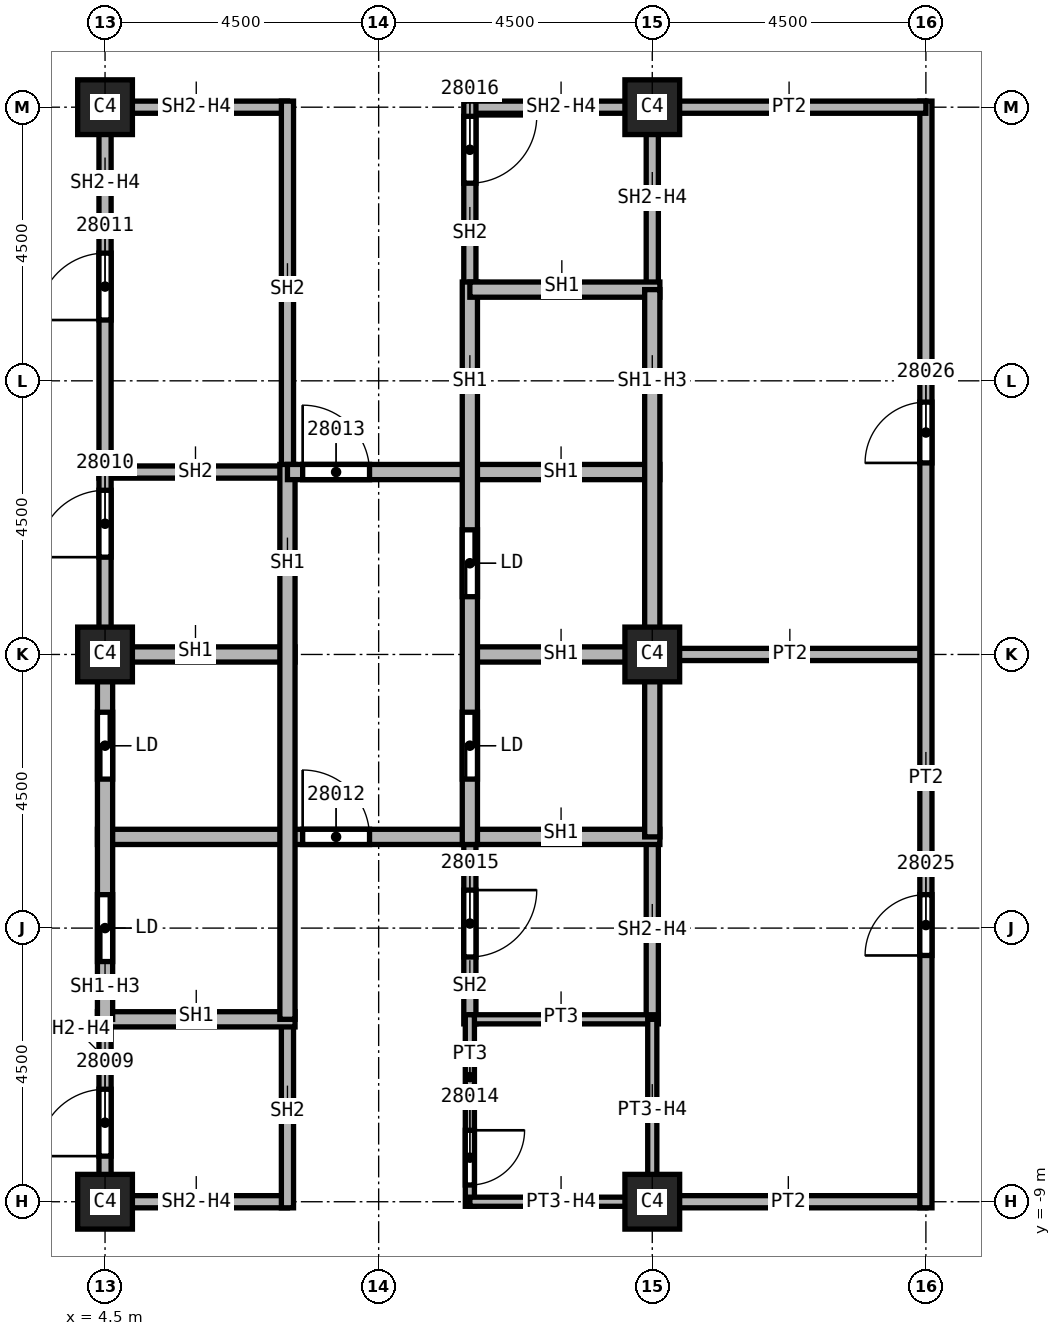
"""IFC4 building model, lengths in metres.
Left out: names, types, materials, properties, quantities, classifications, styles, units other than length and angle.
Written with IfcOpenShell. Run it as: python <this file> out.ifc"""

import sys

from ifc_helpers import new_model, si_unit, direction, frame, frame_2d, origin, origin_2d, place, context, subcontext, project, spatial, rectangle, extrude, element, fill, save


model = new_model("IFC4")
c1 = context("Model", 3, precision=1e-05, world=origin(), true_north=direction((0.0, 1.0)))
c2 = subcontext(c1, "Body", "Model", "MODEL_VIEW")
j1 = project(units=[si_unit("LENGTHUNIT", "METRE"), si_unit("PLANEANGLEUNIT", "RADIAN")], contexts=[c1])
p1 = place(None, origin())
s1 = spatial("IfcSite", under=j1, at=p1, CompositionType="ELEMENT")
p2 = place(p1, origin())
s2 = spatial("IfcBuilding", under=s1, at=p2, CompositionType="ELEMENT")
p3 = place(p2, frame((0.0, 0.0, 236.0)))
s3 = spatial("IfcBuildingStorey", under=s2, at=p3, CompositionType="ELEMENT", Elevation=236.0)
for number, where, z_axis, x_axis in (
    (1, (4.5, 0.0, 0.0), (0.0, 0.0, 1.0), (1.0, 0.0, 0.0)),
    (2, (4.5, 9.0, 0.0), (0.0, 0.0, 1.0), (1.0, 0.0, 0.0)),
    (3, (4.5, -9.0, 0.0), (0.0, 0.0, 1.0), (1.0, 0.0, 0.0)),
    (4, (13.5, 0.0, 0.0), (0.0, 0.0, 1.0), (1.0, 0.0, 0.0)),
    (5, (13.5, 9.0, 0.0), (0.0, 0.0, 1.0), (1.0, 0.0, 0.0)),
    (6, (13.5, -9.0, 0.0), (0.0, 0.0, 1.0), (1.0, 0.0, 0.0)),
):
    element("IfcColumn", number, at=place(p3, frame(where, z_axis=z_axis, x_axis=x_axis)), inside=s3, PredefinedType="COLUMN", context=c2, shape_type="SweptSolid", body=[
        extrude(rectangle(XDim=0.9, YDim=0.9, at=origin_2d()), origin(), (0.0, 0.0, 1.0), 5.72),
    ])
for number, where, z_axis, x_axis in (
    (7, (13.5, -9.0, 0.0), (0.0, 0.0, 1.0), (1.0, 0.0, 0.0)),
    (8, (13.5, 0.0, 0.0), (0.0, 0.0, 1.0), (1.0, 0.0, 0.0)),
):
    element("IfcWall", number, at=place(p3, frame(where, z_axis=z_axis, x_axis=x_axis)), inside=s3, PredefinedType="PARTITIONING", context=c2, shape_type="SweptSolid", body=[
        extrude(rectangle(XDim=4.5, YDim=0.2, at=frame_2d((2.25, 0.0))), origin(), (0.0, 0.0, 1.0), 5.72),
    ])
p4 = place(p3, frame((18.0, -9.1, 0.0), z_axis=(0.0, 0.0, 1.0), x_axis=(0.0, 1.0, 0.0)))
e9 = element("IfcWall", 9, at=p4, inside=s3, PredefinedType="PARTITIONING", context=c2, shape_type="SweptSolid", body=[
    extrude(rectangle(XDim=18.2, YDim=0.2, at=frame_2d((9.1, 0.0))), origin(), (0.0, 0.0, 1.0), 5.72),
])
p5 = place(p4, frame((4.15, 0.0, 0.0)))
e10 = element("IfcOpeningElement", 10, at=p5, cuts=e9, PredefinedType="OPENING", context=c2, shape_type="SweptSolid", body=[
    extrude(rectangle(XDim=1.0, YDim=2.1, at=frame_2d((0.5, 1.05))), frame((0.0, 0.1, 0.0), z_axis=(0.0, -1.0, 0.0), x_axis=(1.0, 0.0, 0.0)), (0.0, 0.0, 1.0), 0.2),
])
p6 = place(p4, frame((12.25, 0.0, 0.0)))
e11 = element("IfcOpeningElement", 11, at=p6, cuts=e9, PredefinedType="OPENING", context=c2, shape_type="SweptSolid", body=[
    extrude(rectangle(XDim=1.0, YDim=2.1, at=frame_2d((0.5, 1.05))), frame((0.0, 0.1, 0.0), z_axis=(0.0, -1.0, 0.0), x_axis=(1.0, 0.0, 0.0)), (0.0, 0.0, 1.0), 0.2),
])
p7 = place(p3, frame((18.0, 9.0, 0.0), z_axis=(0.0, 0.0, 1.0), x_axis=(-1.0, 0.0, 0.0)))
e12 = element("IfcWall", 12, at=p7, inside=s3, PredefinedType="PARTITIONING", context=c2, shape_type="SweptSolid", body=[
    extrude(rectangle(XDim=4.5, YDim=0.2, at=frame_2d((2.25, 0.0))), origin(), (0.0, 0.0, 1.0), 5.72),
])
p8 = place(p3, frame((4.4, 3.0, 0.0), z_axis=(0.0, 0.0, 1.0), x_axis=(1.0, 0.0, 0.0)))
e13 = element("IfcWall", 13, at=p8, inside=s3, PredefinedType="SOLIDWALL", context=c2, shape_type="SweptSolid", body=[
    extrude(rectangle(XDim=3.225, YDim=0.2, at=frame_2d((1.613, 0.0))), origin(), (0.0, 0.0, 1.0), 5.72),
])
p9 = place(p3, frame((4.5, -9.1, 0.0), z_axis=(0.0, 0.0, 1.0), x_axis=(0.0, 1.0, 0.0)))
e14 = element("IfcWall", 14, at=p9, inside=s3, PredefinedType="SOLIDWALL", context=c2, shape_type="SweptSolid", body=[
    extrude(rectangle(XDim=3.1, YDim=0.2, at=frame_2d((1.55, 0.0))), origin(), (0.0, 0.0, 1.0), 5.042),
])
p10 = place(p9, frame((0.85, 0.0, 0.0)))
e15 = element("IfcOpeningElement", 15, at=p10, cuts=e14, PredefinedType="OPENING", context=c2, shape_type="SweptSolid", body=[
    extrude(rectangle(XDim=1.1, YDim=2.1, at=frame_2d((0.55, 1.05))), frame((0.0, 0.1, 0.0), z_axis=(0.0, -1.0, 0.0), x_axis=(1.0, 0.0, 0.0)), (0.0, 0.0, 1.0), 0.2),
])
p11 = place(p3, frame((4.5, 0.0, 0.0), z_axis=(0.0, 0.0, 1.0), x_axis=(0.0, 1.0, 0.0)))
e16 = element("IfcWall", 16, at=p11, inside=s3, PredefinedType="SOLIDWALL", context=c2, shape_type="SweptSolid", body=[
    extrude(rectangle(XDim=9.1, YDim=0.2, at=frame_2d((4.55, 0.0))), origin(), (0.0, 0.0, 1.0), 5.042),
])
p12 = place(p11, frame((1.6, 0.0, 0.0)))
e17 = element("IfcOpeningElement", 17, at=p12, cuts=e16, PredefinedType="OPENING", context=c2, shape_type="SweptSolid", body=[
    extrude(rectangle(XDim=1.1, YDim=2.1, at=frame_2d((0.55, 1.05))), frame((0.0, 0.1, 0.0), z_axis=(0.0, -1.0, 0.0), x_axis=(1.0, 0.0, 0.0)), (0.0, 0.0, 1.0), 0.2),
])
p13 = place(p11, frame((5.5, 0.0, 0.0)))
e18 = element("IfcOpeningElement", 18, at=p13, cuts=e16, PredefinedType="OPENING", context=c2, shape_type="SweptSolid", body=[
    extrude(rectangle(XDim=1.1, YDim=2.1, at=frame_2d((0.55, 1.05))), frame((0.0, 0.1, 0.0), z_axis=(0.0, -1.0, 0.0), x_axis=(1.0, 0.0, 0.0)), (0.0, 0.0, 1.0), 0.2),
])
for number, where, z_axis, x_axis in (
    (19, (4.5, 9.0, 0.0), (0.0, 0.0, 1.0), (1.0, 0.0, 0.0)),
    (20, (7.5, -9.0, 0.0), (0.0, 0.0, 1.0), (-1.0, 0.0, 0.0)),
):
    element("IfcWall", number, at=place(p3, frame(where, z_axis=z_axis, x_axis=x_axis)), inside=s3, PredefinedType="SOLIDWALL", context=c2, shape_type="SweptSolid", body=[
        extrude(rectangle(XDim=3.0, YDim=0.2, at=frame_2d((1.5, 0.0))), origin(), (0.0, 0.0, 1.0), 5.042),
    ])
p14 = place(p3, frame((7.5, -6.0, 0.0), z_axis=(0.0, 0.0, 1.0), x_axis=(0.0, -1.0, 0.0)))
e21 = element("IfcWall", 21, at=p14, inside=s3, PredefinedType="SOLIDWALL", context=c2, shape_type="SweptSolid", body=[
    extrude(rectangle(XDim=3.1, YDim=0.2, at=frame_2d((1.55, 0.0))), origin(), (0.0, 0.0, 1.0), 5.72),
])
p15 = place(p3, frame((7.5, 9.1, 0.0), z_axis=(0.0, 0.0, 1.0), x_axis=(0.0, -1.0, 0.0)))
e22 = element("IfcWall", 22, at=p15, inside=s3, PredefinedType="SOLIDWALL", context=c2, shape_type="SweptSolid", body=[
    extrude(rectangle(XDim=6.225, YDim=0.2, at=frame_2d((3.113, 0.0))), origin(), (0.0, 0.0, 1.0), 5.72),
])
p16 = place(p3, frame((10.5, -2.875, 0.0), z_axis=(0.0, 0.0, 1.0), x_axis=(0.0, -1.0, 0.0)))
e23 = element("IfcWall", 23, at=p16, inside=s3, PredefinedType="SOLIDWALL", context=c2, shape_type="SweptSolid", body=[
    extrude(rectangle(XDim=3.2, YDim=0.2, at=frame_2d((1.6, 0.0))), origin(), (0.0, 0.0, 1.0), 5.72),
])
p17 = place(p16, frame((1.0, 0.0, 0.0)))
e24 = element("IfcOpeningElement", 24, at=p17, cuts=e23, PredefinedType="OPENING", context=c2, shape_type="SweptSolid", body=[
    extrude(rectangle(XDim=1.1, YDim=2.1, at=frame_2d((0.55, 1.05))), frame((0.0, 0.1, 0.0), z_axis=(0.0, -1.0, 0.0), x_axis=(1.0, 0.0, 0.0)), (0.0, 0.0, 1.0), 0.2),
])
p18 = place(p3, frame((10.5, 9.0, 0.0), z_axis=(0.0, 0.0, 1.0), x_axis=(1.0, 0.0, 0.0)))
e25 = element("IfcWall", 25, at=p18, inside=s3, PredefinedType="SOLIDWALL", context=c2, shape_type="SweptSolid", body=[
    extrude(rectangle(XDim=3.1, YDim=0.2, at=frame_2d((1.55, 0.0))), origin(), (0.0, 0.0, 1.0), 5.042),
])
p19 = place(p3, frame((10.5, 9.1, 0.0), z_axis=(0.0, 0.0, 1.0), x_axis=(0.0, -1.0, 0.0)))
e26 = element("IfcWall", 26, at=p19, inside=s3, PredefinedType="SOLIDWALL", context=c2, shape_type="SweptSolid", body=[
    extrude(rectangle(XDim=3.225, YDim=0.2, at=frame_2d((1.613, 0.0))), origin(), (0.0, 0.0, 1.0), 5.72),
])
p20 = place(p19, frame((0.25, 0.0, 0.0)))
e27 = element("IfcOpeningElement", 27, at=p20, cuts=e26, PredefinedType="OPENING", context=c2, shape_type="SweptSolid", body=[
    extrude(rectangle(XDim=1.1, YDim=2.1, at=frame_2d((0.55, 1.05))), frame((0.0, 0.1, 0.0), z_axis=(0.0, -1.0, 0.0), x_axis=(1.0, 0.0, 0.0)), (0.0, 0.0, 1.0), 0.2),
])
p21 = place(p3, frame((13.5, -3.0, 0.0), z_axis=(0.0, 0.0, 1.0), x_axis=(0.0, -1.0, 0.0)))
e28 = element("IfcWall", 28, at=p21, inside=s3, PredefinedType="SOLIDWALL", context=c2, shape_type="SweptSolid", body=[
    extrude(rectangle(XDim=3.0, YDim=0.2, at=frame_2d((1.5, 0.0))), origin(), (0.0, 0.0, 1.0), 5.042),
])
p22 = place(p3, frame((13.5, 9.1, 0.0), z_axis=(0.0, 0.0, 1.0), x_axis=(0.0, -1.0, 0.0)))
e29 = element("IfcWall", 29, at=p22, inside=s3, PredefinedType="SOLIDWALL", context=c2, shape_type="SweptSolid", body=[
    extrude(rectangle(XDim=3.1, YDim=0.2, at=frame_2d((1.55, 0.0))), origin(), (0.0, 0.0, 1.0), 5.042),
])
p23 = place(p3, frame((4.375, -6.0, 0.0), z_axis=(0.0, 0.0, 1.0), x_axis=(1.0, 0.0, 0.0)))
e30 = element("IfcWall", 30, at=p23, inside=s3, PredefinedType="SOLIDWALL", context=c2, shape_type="SweptSolid", body=[
    extrude(rectangle(XDim=3.25, YDim=0.25, at=frame_2d((1.625, 0.0))), origin(), (0.0, 0.0, 1.0), 5.72),
])
p24 = place(p3, frame((4.375, -3.0, 0.0), z_axis=(0.0, 0.0, 1.0), x_axis=(1.0, 0.0, 0.0)))
e31 = element("IfcWall", 31, at=p24, inside=s3, PredefinedType="SOLIDWALL", context=c2, shape_type="SweptSolid", body=[
    extrude(rectangle(XDim=9.25, YDim=0.25, at=frame_2d((4.625, 0.0))), origin(), (0.0, 0.0, 1.0), 5.72),
])
p25 = place(p24, frame((3.375, 0.0, 0.0)))
e32 = element("IfcOpeningElement", 32, at=p25, cuts=e31, PredefinedType="OPENING", context=c2, shape_type="SweptSolid", body=[
    extrude(rectangle(XDim=1.1, YDim=2.1, at=frame_2d((0.55, 1.05))), frame((0.0, 0.125, 0.0), z_axis=(0.0, -1.0, 0.0), x_axis=(1.0, 0.0, 0.0)), (0.0, 0.0, 1.0), 0.25),
])
p26 = place(p3, frame((4.375, 0.0, 0.0), z_axis=(0.0, 0.0, 1.0), x_axis=(1.0, 0.0, 0.0)))
e33 = element("IfcWall", 33, at=p26, inside=s3, PredefinedType="SOLIDWALL", context=c2, shape_type="SweptSolid", body=[
    extrude(rectangle(XDim=3.25, YDim=0.25, at=frame_2d((1.625, 0.0))), origin(), (0.0, 0.0, 1.0), 5.72),
])
p27 = place(p3, frame((4.5, -6.0, 0.0), z_axis=(0.0, 0.0, 1.0), x_axis=(0.0, 1.0, 0.0)))
e34 = element("IfcWall", 34, at=p27, inside=s3, PredefinedType="SOLIDWALL", context=c2, shape_type="SweptSolid", body=[
    extrude(rectangle(XDim=6.0, YDim=0.25, at=frame_2d((3.0, 0.0))), origin(), (0.0, 0.0, 1.0), 5.042),
])
p28 = place(p27, frame((0.95, 0.0, 0.0)))
e35 = element("IfcOpeningElement", 35, at=p28, cuts=e34, PredefinedType="OPENING", context=c2, shape_type="SweptSolid", body=[
    extrude(rectangle(XDim=1.1, YDim=2.1, at=frame_2d((0.55, 1.05))), frame((0.0, 0.125, 0.0), z_axis=(0.0, -1.0, 0.0), x_axis=(1.0, 0.0, 0.0)), (0.0, 0.0, 1.0), 0.25),
])
p29 = place(p27, frame((3.95, 0.0, 0.0)))
e36 = element("IfcOpeningElement", 36, at=p29, cuts=e34, PredefinedType="OPENING", context=c2, shape_type="SweptSolid", body=[
    extrude(rectangle(XDim=1.1, YDim=2.1, at=frame_2d((0.55, 1.05))), frame((0.0, 0.125, 0.0), z_axis=(0.0, -1.0, 0.0), x_axis=(1.0, 0.0, 0.0)), (0.0, 0.0, 1.0), 0.25),
])
p30 = place(p3, frame((7.5, 3.125, 0.0), z_axis=(0.0, 0.0, 1.0), x_axis=(0.0, -1.0, 0.0)))
e37 = element("IfcWall", 37, at=p30, inside=s3, PredefinedType="SOLIDWALL", context=c2, shape_type="SweptSolid", body=[
    extrude(rectangle(XDim=9.125, YDim=0.25, at=frame_2d((4.562, 0.0))), origin(), (0.0, 0.0, 1.0), 5.72),
])
p31 = place(p3, frame((7.5, 3.0, 0.0), z_axis=(0.0, 0.0, 1.0), x_axis=(1.0, 0.0, 0.0)))
e38 = element("IfcWall", 38, at=p31, inside=s3, PredefinedType="SOLIDWALL", context=c2, shape_type="SweptSolid", body=[
    extrude(rectangle(XDim=6.125, YDim=0.25, at=frame_2d((3.062, 0.0))), origin(), (0.0, 0.0, 1.0), 5.72),
])
p32 = place(p31, frame((0.25, 0.0, 0.0)))
e39 = element("IfcOpeningElement", 39, at=p32, cuts=e38, PredefinedType="OPENING", context=c2, shape_type="SweptSolid", body=[
    extrude(rectangle(XDim=1.1, YDim=2.1, at=frame_2d((0.55, 1.05))), frame((0.0, 0.125, 0.0), z_axis=(0.0, -1.0, 0.0), x_axis=(1.0, 0.0, 0.0)), (0.0, 0.0, 1.0), 0.25),
])
p33 = place(p3, frame((10.5, 0.0, 0.0), z_axis=(0.0, 0.0, 1.0), x_axis=(1.0, 0.0, 0.0)))
e40 = element("IfcWall", 40, at=p33, inside=s3, PredefinedType="SOLIDWALL", context=c2, shape_type="SweptSolid", body=[
    extrude(rectangle(XDim=3.125, YDim=0.25, at=frame_2d((1.562, 0.0))), origin(), (0.0, 0.0, 1.0), 5.72),
])
p34 = place(p3, frame((10.5, 6.125, 0.0), z_axis=(0.0, 0.0, 1.0), x_axis=(0.0, -1.0, 0.0)))
e41 = element("IfcWall", 41, at=p34, inside=s3, PredefinedType="SOLIDWALL", context=c2, shape_type="SweptSolid", body=[
    extrude(rectangle(XDim=9.25, YDim=0.25, at=frame_2d((4.625, 0.0))), origin(), (0.0, 0.0, 1.0), 5.72),
])
p35 = place(p34, frame((7.075, 0.0, 0.0)))
e42 = element("IfcOpeningElement", 42, at=p35, cuts=e41, PredefinedType="OPENING", context=c2, shape_type="SweptSolid", body=[
    extrude(rectangle(XDim=1.1, YDim=2.1, at=frame_2d((0.55, 1.05))), frame((0.0, 0.125, 0.0), z_axis=(0.0, -1.0, 0.0), x_axis=(1.0, 0.0, 0.0)), (0.0, 0.0, 1.0), 0.25),
])
p36 = place(p34, frame((4.075, 0.0, 0.0)))
e43 = element("IfcOpeningElement", 43, at=p36, cuts=e41, PredefinedType="OPENING", context=c2, shape_type="SweptSolid", body=[
    extrude(rectangle(XDim=1.1, YDim=2.1, at=frame_2d((0.55, 1.05))), frame((0.0, 0.125, 0.0), z_axis=(0.0, -1.0, 0.0), x_axis=(1.0, 0.0, 0.0)), (0.0, 0.0, 1.0), 0.25),
])
p37 = place(p3, frame((10.5, 6.0, 0.0), z_axis=(0.0, 0.0, 1.0), x_axis=(1.0, 0.0, 0.0)))
e44 = element("IfcWall", 44, at=p37, inside=s3, PredefinedType="SOLIDWALL", context=c2, shape_type="SweptSolid", body=[
    extrude(rectangle(XDim=3.125, YDim=0.25, at=frame_2d((1.562, 0.0))), origin(), (0.0, 0.0, 1.0), 5.72),
])
p38 = place(p3, frame((13.5, 6.0, 0.0), z_axis=(0.0, 0.0, 1.0), x_axis=(0.0, -1.0, 0.0)))
e45 = element("IfcWall", 45, at=p38, inside=s3, PredefinedType="SOLIDWALL", context=c2, shape_type="SweptSolid", body=[
    extrude(rectangle(XDim=9.0, YDim=0.25, at=frame_2d((4.5, 0.0))), origin(), (0.0, 0.0, 1.0), 5.042),
])
p39 = place(p3, frame((10.5, -6.0, 0.0), z_axis=(0.0, 0.0, 1.0), x_axis=(1.0, 0.0, 0.0)))
e46 = element("IfcWall", 46, at=p39, inside=s3, PredefinedType="PARTITIONING", context=c2, shape_type="SweptSolid", body=[
    extrude(rectangle(XDim=3.1, YDim=0.15, at=frame_2d((1.55, 0.0))), origin(), (0.0, 0.0, 1.0), 5.72),
])
p40 = place(p3, frame((10.5, -5.925, 0.0), z_axis=(0.0, 0.0, 1.0), x_axis=(0.0, -1.0, 0.0)))
e47 = element("IfcWall", 47, at=p40, inside=s3, PredefinedType="PARTITIONING", context=c2, shape_type="SweptSolid", body=[
    extrude(rectangle(XDim=3.15, YDim=0.15, at=frame_2d((1.575, 0.0))), origin(), (0.0, 0.0, 1.0), 5.72),
])
p41 = place(p40, frame((1.9, 0.0, 0.0)))
e48 = element("IfcOpeningElement", 48, at=p41, cuts=e47, PredefinedType="OPENING", context=c2, shape_type="SweptSolid", body=[
    extrude(rectangle(XDim=0.9, YDim=2.1, at=frame_2d((0.45, 1.05))), frame((0.0, 0.075, 0.0), z_axis=(0.0, -1.0, 0.0), x_axis=(1.0, 0.0, 0.0)), (0.0, 0.0, 1.0), 0.15),
])
p42 = place(p3, frame((13.5, -6.0, 0.0), z_axis=(0.0, 0.0, 1.0), x_axis=(0.0, -1.0, 0.0)))
e49 = element("IfcWall", 49, at=p42, inside=s3, PredefinedType="PARTITIONING", context=c2, shape_type="SweptSolid", body=[
    extrude(rectangle(XDim=3.1, YDim=0.15, at=frame_2d((1.55, 0.0))), origin(), (0.0, 0.0, 1.0), 5.042),
])
p43 = place(p3, frame((13.575, -9.0, 0.0), z_axis=(0.0, 0.0, 1.0), x_axis=(-1.0, 0.0, 0.0)))
e50 = element("IfcWall", 50, at=p43, inside=s3, PredefinedType="PARTITIONING", context=c2, shape_type="SweptSolid", body=[
    extrude(rectangle(XDim=3.075, YDim=0.15, at=frame_2d((1.538, 0.0))), origin(), (0.0, 0.0, 1.0), 5.042),
])
p44 = place(p10, origin())
e51 = element("IfcDoor", 51, at=p44, inside=s3, OperationType="SINGLE_SWING_RIGHT", PredefinedType="DOOR", context=c2, shape_type="SweptSolid", body=[
    extrude(rectangle(XDim=1.1, YDim=2.1, at=frame_2d((0.55, 1.05))), frame((0.0, 0.025, 0.0), z_axis=(0.0, -1.0, 0.0), x_axis=(1.0, 0.0, 0.0)), (0.0, 0.0, 1.0), 0.05),
])
fill(e15, e51)
p45 = place(p12, origin())
e52 = element("IfcDoor", 52, at=p45, inside=s3, OperationType="SINGLE_SWING_LEFT", PredefinedType="DOOR", context=c2, shape_type="SweptSolid", body=[
    extrude(rectangle(XDim=1.1, YDim=2.1, at=frame_2d((0.55, 1.05))), frame((0.0, 0.025, 0.0), z_axis=(0.0, -1.0, 0.0), x_axis=(1.0, 0.0, 0.0)), (0.0, 0.0, 1.0), 0.05),
])
fill(e17, e52)
p46 = place(p13, origin())
e53 = element("IfcDoor", 53, at=p46, inside=s3, OperationType="SINGLE_SWING_RIGHT", PredefinedType="DOOR", context=c2, shape_type="SweptSolid", body=[
    extrude(rectangle(XDim=1.1, YDim=2.1, at=frame_2d((0.55, 1.05))), frame((0.0, 0.025, 0.0), z_axis=(0.0, -1.0, 0.0), x_axis=(1.0, 0.0, 0.0)), (0.0, 0.0, 1.0), 0.05),
])
fill(e18, e53)
p47 = place(p25, origin())
e54 = element("IfcDoor", 54, at=p47, inside=s3, OperationType="SINGLE_SWING_LEFT", PredefinedType="DOOR", context=c2, shape_type="SweptSolid", body=[
    extrude(rectangle(XDim=1.1, YDim=2.1, at=frame_2d((0.55, 1.05))), frame((0.0, 0.025, 0.0), z_axis=(0.0, -1.0, 0.0), x_axis=(1.0, 0.0, 0.0)), (0.0, 0.0, 1.0), 0.05),
])
fill(e32, e54)
p48 = place(p32, origin())
e55 = element("IfcDoor", 55, at=p48, inside=s3, OperationType="SINGLE_SWING_RIGHT", PredefinedType="DOOR", context=c2, shape_type="SweptSolid", body=[
    extrude(rectangle(XDim=1.1, YDim=2.1, at=frame_2d((0.55, 1.05))), frame((0.0, 0.025, 0.0), z_axis=(0.0, -1.0, 0.0), x_axis=(1.0, 0.0, 0.0)), (0.0, 0.0, 1.0), 0.05),
])
fill(e39, e55)
p49 = place(p41, origin())
e56 = element("IfcDoor", 56, at=p49, inside=s3, OperationType="SINGLE_SWING_LEFT", PredefinedType="DOOR", context=c2, shape_type="SweptSolid", body=[
    extrude(rectangle(XDim=0.9, YDim=2.1, at=frame_2d((0.45, 1.05))), frame((0.0, 0.025, 0.0), z_axis=(0.0, -1.0, 0.0), x_axis=(1.0, 0.0, 0.0)), (0.0, 0.0, 1.0), 0.05),
])
fill(e48, e56)
p50 = place(p17, origin())
e57 = element("IfcDoor", 57, at=p50, inside=s3, OperationType="SINGLE_SWING_RIGHT", PredefinedType="DOOR", context=c2, shape_type="SweptSolid", body=[
    extrude(rectangle(XDim=1.1, YDim=2.1, at=frame_2d((0.55, 1.05))), frame((0.0, 0.025, 0.0), z_axis=(0.0, -1.0, 0.0), x_axis=(1.0, 0.0, 0.0)), (0.0, 0.0, 1.0), 0.05),
])
fill(e24, e57)
p51 = place(p20, origin())
e58 = element("IfcDoor", 58, at=p51, inside=s3, OperationType="SINGLE_SWING_LEFT", PredefinedType="DOOR", context=c2, shape_type="SweptSolid", body=[
    extrude(rectangle(XDim=1.1, YDim=2.1, at=frame_2d((0.55, 1.05))), frame((0.0, 0.025, 0.0), z_axis=(0.0, -1.0, 0.0), x_axis=(1.0, 0.0, 0.0)), (0.0, 0.0, 1.0), 0.05),
])
fill(e27, e58)
p52 = place(p5, origin())
e59 = element("IfcDoor", 59, at=p52, inside=s3, OperationType="SINGLE_SWING_RIGHT", PredefinedType="DOOR", context=c2, shape_type="SweptSolid", body=[
    extrude(rectangle(XDim=1.0, YDim=2.1, at=frame_2d((0.5, 1.05))), frame((0.0, 0.025, 0.0), z_axis=(0.0, -1.0, 0.0), x_axis=(1.0, 0.0, 0.0)), (0.0, 0.0, 1.0), 0.05),
])
fill(e10, e59)
p53 = place(p6, origin())
e60 = element("IfcDoor", 60, at=p53, inside=s3, OperationType="SINGLE_SWING_LEFT", PredefinedType="DOOR", context=c2, shape_type="SweptSolid", body=[
    extrude(rectangle(XDim=1.0, YDim=2.1, at=frame_2d((0.5, 1.05))), frame((0.0, 0.025, 0.0), z_axis=(0.0, -1.0, 0.0), x_axis=(1.0, 0.0, 0.0)), (0.0, 0.0, 1.0), 0.05),
])
fill(e11, e60)
p54 = place(p28, origin())
e61 = element("IfcDoor", 61, at=p54, inside=s3, OperationType="SLIDING_TO_LEFT", PredefinedType="DOOR", context=c2, shape_type="SweptSolid", body=[
    extrude(rectangle(XDim=1.1, YDim=2.1, at=frame_2d((0.55, 1.05))), frame((0.0, 0.025, 0.0), z_axis=(0.0, -1.0, 0.0), x_axis=(1.0, 0.0, 0.0)), (0.0, 0.0, 1.0), 0.05),
])
fill(e35, e61)
p55 = place(p29, origin())
e62 = element("IfcDoor", 62, at=p55, inside=s3, OperationType="SLIDING_TO_LEFT", PredefinedType="DOOR", context=c2, shape_type="SweptSolid", body=[
    extrude(rectangle(XDim=1.1, YDim=2.1, at=frame_2d((0.55, 1.05))), frame((0.0, 0.025, 0.0), z_axis=(0.0, -1.0, 0.0), x_axis=(1.0, 0.0, 0.0)), (0.0, 0.0, 1.0), 0.05),
])
fill(e36, e62)
p56 = place(p35, origin())
e63 = element("IfcDoor", 63, at=p56, inside=s3, OperationType="SLIDING_TO_LEFT", PredefinedType="DOOR", context=c2, shape_type="SweptSolid", body=[
    extrude(rectangle(XDim=1.1, YDim=2.1, at=frame_2d((0.55, 1.05))), frame((0.0, 0.025, 0.0), z_axis=(0.0, -1.0, 0.0), x_axis=(1.0, 0.0, 0.0)), (0.0, 0.0, 1.0), 0.05),
])
fill(e42, e63)
p57 = place(p36, origin())
e64 = element("IfcDoor", 64, at=p57, inside=s3, OperationType="SLIDING_TO_LEFT", PredefinedType="DOOR", context=c2, shape_type="SweptSolid", body=[
    extrude(rectangle(XDim=1.1, YDim=2.1, at=frame_2d((0.55, 1.05))), frame((0.0, 0.025, 0.0), z_axis=(0.0, -1.0, 0.0), x_axis=(1.0, 0.0, 0.0)), (0.0, 0.0, 1.0), 0.05),
])
fill(e43, e64)
save(model, sys.argv[1])
